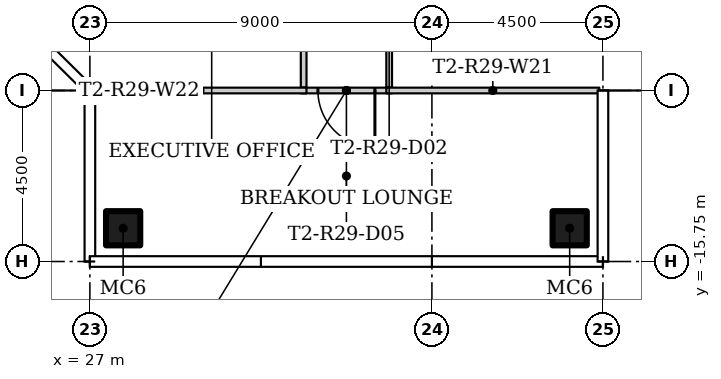
"""IFC4 building model, lengths in metres.
Left out: names, types, materials, properties, quantities, classifications, styles, units other than length and angle.
Written with IfcOpenShell. Run it as: python <this file> out.ifc"""

import sys

from ifc_helpers import new_model, si_unit, direction, frame, frame_2d, origin, origin_2d, place, context, subcontext, project, spatial, rectangle, hollow_rectangle, extrude, element, fill, save


model = new_model("IFC4")
c1 = context("Model", 3, precision=1e-05, world=origin(), true_north=direction((0.0, 1.0)))
c2 = subcontext(c1, "Body", "Model", "MODEL_VIEW")
j1 = project(units=[si_unit("LENGTHUNIT", "METRE"), si_unit("PLANEANGLEUNIT", "RADIAN")], contexts=[c1])
p1 = place(None, origin())
s1 = spatial("IfcSite", under=j1, at=p1, CompositionType="ELEMENT")
p2 = place(p1, origin())
s2 = spatial("IfcBuilding", under=s1, at=p2, CompositionType="ELEMENT")
p3 = place(p2, frame((0.0, 0.0, 261.6)))
s3 = spatial("IfcBuildingStorey", under=s2, at=p3, CompositionType="ELEMENT", Elevation=261.6)
for number, where in (
    (1, (39.625, -14.875, 0.0)),
    (2, (27.875, -14.875, 0.0)),
):
    element("IfcColumn", number, at=place(p3, frame(where)), inside=s3, PredefinedType="COLUMN", context=c2, shape_type="SweptSolid", body=[
        extrude(hollow_rectangle(XDim=0.9, YDim=0.9, WallThickness=0.036, at=origin_2d()), origin(), (0.0, 0.0, 1.0), 3.55),
    ])
p4 = place(p3, frame((32.625, -11.175, 0.0), z_axis=(0.0, 0.0, 1.0), x_axis=(0.0, 1.0, 0.0)))
e3 = element("IfcWall", 3, at=p4, inside=s3, PredefinedType="PARTITIONING", context=c2, shape_type="SweptSolid", body=[
    extrude(rectangle(XDim=11.15, YDim=0.15, at=frame_2d((5.575, 0.0))), origin(), (0.0, 0.0, 1.0), 3.55),
])
p5 = place(p4, frame((7.375, 0.0, 0.0)))
e4 = element("IfcOpeningElement", 4, at=p5, cuts=e3, PredefinedType="OPENING", context=c2, shape_type="SweptSolid", body=[
    extrude(rectangle(XDim=0.9, YDim=2.1, at=frame_2d((0.45, 1.05))), frame((0.0, 0.085, 0.0), z_axis=(0.0, -1.0, 0.0), x_axis=(1.0, 0.0, 0.0)), (0.0, 0.0, 1.0), 0.17),
])
p6 = place(p4, frame((1.675, 0.0, 0.0)))
e5 = element("IfcOpeningElement", 5, at=p6, cuts=e3, PredefinedType="OPENING", context=c2, shape_type="SweptSolid", body=[
    extrude(rectangle(XDim=1.0, YDim=2.4, at=frame_2d((0.5, 1.2))), frame((0.0, 0.085, 0.0), z_axis=(0.0, -1.0, 0.0), x_axis=(1.0, 0.0, 0.0)), (0.0, 0.0, 1.0), 0.17),
])
p7 = place(p3, frame((34.875, -6.85, 0.0), z_axis=(0.0, 0.0, 1.0), x_axis=(0.0, -1.0, 0.0)))
e6 = element("IfcWall", 6, at=p7, inside=s3, PredefinedType="PARTITIONING", context=c2, shape_type="SweptSolid", body=[
    extrude(rectangle(XDim=4.325, YDim=0.15, at=frame_2d((2.163, 0.0))), origin(), (0.0, 0.0, 1.0), 3.55),
])
p8 = place(p7, frame((1.4, 0.0, 0.0)))
e7 = element("IfcOpeningElement", 7, at=p8, cuts=e6, PredefinedType="OPENING", context=c2, shape_type="SweptSolid", body=[
    extrude(rectangle(XDim=1.5, YDim=2.1, at=frame_2d((0.75, 1.05))), frame((0.0, 0.085, 0.0), z_axis=(0.0, -1.0, 0.0), x_axis=(1.0, 0.0, 0.0)), (0.0, 0.0, 1.0), 0.17),
])
p9 = place(p3, frame((34.95, -11.25, 0.0), z_axis=(0.0, 0.0, 1.0), x_axis=(-1.0, 0.0, 0.0)))
e8 = element("IfcWall", 8, at=p9, inside=s3, PredefinedType="PARTITIONING", context=c2, shape_type="SweptSolid", body=[
    extrude(rectangle(XDim=2.4, YDim=0.15, at=frame_2d((1.2, 0.0))), origin(), (0.0, 0.0, 1.0), 3.55),
])
p10 = place(p9, frame((0.45, 0.0, 0.0)))
e9 = element("IfcOpeningElement", 9, at=p10, cuts=e8, PredefinedType="OPENING", context=c2, shape_type="SweptSolid", body=[
    extrude(rectangle(XDim=1.5, YDim=2.1, at=frame_2d((0.75, 1.05))), frame((0.0, 0.085, 0.0), z_axis=(0.0, -1.0, 0.0), x_axis=(1.0, 0.0, 0.0)), (0.0, 0.0, 1.0), 0.17),
])
for number, where in (
    (10, (34.8, -11.25, 0.0)),
    (11, (27.095, -11.25, 0.0)),
):
    element("IfcWall", number, at=place(p3, frame(where)), inside=s3, PredefinedType="PARTITIONING", context=c2, shape_type="SweptSolid", body=[
        extrude(rectangle(XDim=5.605, YDim=0.15, at=frame_2d((2.802, 0.0))), origin(), (0.0, 0.0, 1.0), 3.55),
    ])
p11 = place(p10, origin())
e12 = element("IfcDoor", 12, at=p11, inside=s3, OperationType="DOUBLE_DOOR_SINGLE_SWING", PredefinedType="DOOR", context=c2, shape_type="SweptSolid", body=[
    extrude(rectangle(XDim=1.5, YDim=2.1, at=frame_2d((0.75, 1.05))), frame((0.0, 0.025, 0.0), z_axis=(0.0, -1.0, 0.0), x_axis=(1.0, 0.0, 0.0)), (0.0, 0.0, 1.0), 0.05),
])
fill(e9, e12)
save(model, sys.argv[1])
